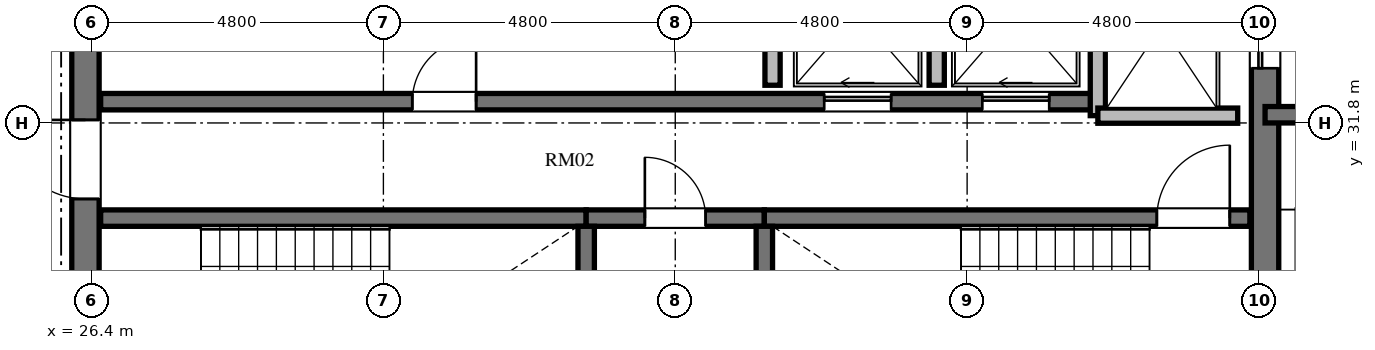
"""IFC4 building model, lengths in metres.
Left out: names, types, materials, properties, quantities, classifications, styles, units other than length and angle.
Written with IfcOpenShell. Run it as: python <this file> out.ifc"""

import sys

from ifc_helpers import new_model, si_unit, direction, frame, frame_2d, origin, place, context, subcontext, project, spatial, rectangle, extrude, element, fill, save


model = new_model("IFC4")
c1 = context("Model", 3, precision=1e-05, world=origin(), true_north=direction((0.0, 1.0)))
c2 = subcontext(c1, "Body", "Model", "MODEL_VIEW")
j1 = project(units=[si_unit("LENGTHUNIT", "METRE"), si_unit("PLANEANGLEUNIT", "RADIAN")], contexts=[c1])
p1 = place(None, origin())
s1 = spatial("IfcSite", under=j1, at=p1, CompositionType="ELEMENT")
p2 = place(p1, origin())
s2 = spatial("IfcBuilding", under=s1, at=p2, CompositionType="ELEMENT")
p3 = place(p2, frame((0.0, 0.0, 242.256)))
s3 = spatial("IfcBuildingStorey", under=s2, at=p3, CompositionType="ELEMENT", Elevation=242.256)
p4 = place(p3, frame((26.3, 20.95, 0.0), z_axis=(0.0, 0.0, 1.0), x_axis=(0.0, 1.0, 0.0)))
e1 = element("IfcWall", 1, at=p4, inside=s3, PredefinedType="SHEAR", context=c2, shape_type="SweptSolid", body=[
    extrude(rectangle(XDim=14.1, YDim=0.45, at=frame_2d((7.05, 0.0))), origin(), (0.0, 0.0, 1.0), 3.648),
])
p5 = place(p4, frame((6.5, 0.0, 0.0)))
e2 = element("IfcOpeningElement", 2, at=p5, cuts=e1, PredefinedType="OPENING", context=c2, shape_type="SweptSolid", body=[
    extrude(rectangle(XDim=1.2, YDim=2.15, at=frame_2d((0.6, 1.075))), frame((0.0, 0.235, 0.0), z_axis=(0.0, -1.0, 0.0), x_axis=(1.0, 0.0, 0.0)), (0.0, 0.0, 1.0), 0.47),
])
p6 = place(p4, frame((9.6, 0.0, 0.0)))
e3 = element("IfcOpeningElement", 3, at=p6, cuts=e1, PredefinedType="OPENING", context=c2, shape_type="SweptSolid", body=[
    extrude(rectangle(XDim=1.3, YDim=2.2, at=frame_2d((0.65, 1.1))), frame((0.0, 0.235, 0.0), z_axis=(0.0, -1.0, 0.0), x_axis=(1.0, 0.0, 0.0)), (0.0, 0.0, 1.0), 0.47),
])
p7 = place(p4, frame((3.26, 0.0, 0.0)))
e4 = element("IfcOpeningElement", 4, at=p7, cuts=e1, PredefinedType="OPENING", context=c2, shape_type="SweptSolid", body=[
    extrude(rectangle(XDim=1.3, YDim=2.2, at=frame_2d((0.65, 1.1))), frame((0.0, 0.235, 0.0), z_axis=(0.0, -1.0, 0.0), x_axis=(1.0, 0.0, 0.0)), (0.0, 0.0, 1.0), 0.47),
])
p8 = place(p3, frame((45.7, 20.95, 0.0), z_axis=(0.0, 0.0, 1.0), x_axis=(0.0, 1.0, 0.0)))
e5 = element("IfcWall", 5, at=p8, inside=s3, PredefinedType="SHEAR", context=c2, shape_type="SweptSolid", body=[
    extrude(rectangle(XDim=14.1, YDim=0.45, at=frame_2d((7.05, 0.0))), origin(), (0.0, 0.0, 1.0), 3.648),
])
p9 = place(p8, frame((11.75, 0.0, 0.0)))
e6 = element("IfcOpeningElement", 6, at=p9, cuts=e5, PredefinedType="OPENING", context=c2, shape_type="SweptSolid", body=[
    extrude(rectangle(XDim=1.4, YDim=2.3, at=frame_2d((0.7, 1.15))), frame((0.0, 0.235, 0.0), z_axis=(0.0, -1.0, 0.0), x_axis=(1.0, 0.0, 0.0)), (0.0, 0.0, 1.0), 0.47),
])
p10 = place(p8, frame((0.95, 0.0, 0.0)))
e7 = element("IfcOpeningElement", 7, at=p10, cuts=e5, PredefinedType="OPENING", context=c2, shape_type="SweptSolid", body=[
    extrude(rectangle(XDim=1.4, YDim=2.3, at=frame_2d((0.7, 1.15))), frame((0.0, 0.235, 0.0), z_axis=(0.0, -1.0, 0.0), x_axis=(1.0, 0.0, 0.0)), (0.0, 0.0, 1.0), 0.47),
])
p11 = place(p3, frame((26.55, 30.235, 0.0), z_axis=(0.0, 0.0, 1.0), x_axis=(1.0, 0.0, 0.0)))
e8 = element("IfcWall", 8, at=p11, inside=s3, PredefinedType="SHEAR", context=c2, shape_type="SweptSolid", body=[
    extrude(rectangle(XDim=7.985, YDim=0.27, at=frame_2d((3.992, 0.0))), origin(), (0.0, 0.0, 1.0), 3.648),
])
p12 = place(p3, frame((34.535, 30.235, 0.0), z_axis=(0.0, 0.0, 1.0), x_axis=(1.0, 0.0, 0.0)))
e9 = element("IfcWall", 9, at=p12, inside=s3, PredefinedType="SHEAR", context=c2, shape_type="SweptSolid", body=[
    extrude(rectangle(XDim=2.93, YDim=0.27, at=frame_2d((1.465, 0.0))), origin(), (0.0, 0.0, 1.0), 3.648),
])
p13 = place(p12, frame((0.965, 0.0, 0.0)))
e10 = element("IfcOpeningElement", 10, at=p13, cuts=e9, PredefinedType="OPENING", context=c2, shape_type="SweptSolid", body=[
    extrude(rectangle(XDim=1.0, YDim=2.1, at=frame_2d((0.5, 1.05))), frame((0.0, 0.145, 0.0), z_axis=(0.0, -1.0, 0.0), x_axis=(1.0, 0.0, 0.0)), (0.0, 0.0, 1.0), 0.29),
])
p14 = place(p3, frame((37.465, 30.235, 0.0), z_axis=(0.0, 0.0, 1.0), x_axis=(1.0, 0.0, 0.0)))
e11 = element("IfcWall", 11, at=p14, inside=s3, PredefinedType="SHEAR", context=c2, shape_type="SweptSolid", body=[
    extrude(rectangle(XDim=7.985, YDim=0.27, at=frame_2d((3.992, 0.0))), origin(), (0.0, 0.0, 1.0), 3.648),
])
p15 = place(p14, frame((6.455, 0.0, 0.0)))
e12 = element("IfcOpeningElement", 12, at=p15, cuts=e11, PredefinedType="OPENING", context=c2, shape_type="SweptSolid", body=[
    extrude(rectangle(XDim=1.2, YDim=2.15, at=frame_2d((0.6, 1.075))), frame((0.0, 0.145, 0.0), z_axis=(0.0, -1.0, 0.0), x_axis=(1.0, 0.0, 0.0)), (0.0, 0.0, 1.0), 0.29),
])
for number, where, z_axis, x_axis in (
    (13, (34.535, 26.02, 0.0), (0.0, 0.0, 1.0), (0.0, 1.0, 0.0)),
    (14, (37.465, 26.02, 0.0), (0.0, 0.0, 1.0), (0.0, 1.0, 0.0)),
):
    element("IfcWall", number, at=place(p3, frame(where, z_axis=z_axis, x_axis=x_axis)), inside=s3, PredefinedType="SHEAR", context=c2, shape_type="SweptSolid", body=[
        extrude(rectangle(XDim=4.08, YDim=0.27, at=frame_2d((2.04, 0.0))), origin(), (0.0, 0.0, 1.0), 3.648),
    ])
p16 = place(p3, frame((26.55, 32.15, 0.0), z_axis=(0.0, 0.0, 1.0), x_axis=(1.0, 0.0, 0.0)))
e15 = element("IfcWall", 15, at=p16, inside=s3, PredefinedType="SHEAR", context=c2, shape_type="SweptSolid", body=[
    extrude(rectangle(XDim=16.4, YDim=0.27, at=frame_2d((8.2, 0.0))), origin(), (0.0, 0.0, 1.0), 3.648),
])
p17 = place(p16, frame((5.125, 0.0, 0.0)))
e16 = element("IfcOpeningElement", 16, at=p17, cuts=e15, PredefinedType="OPENING", context=c2, shape_type="SweptSolid", body=[
    extrude(rectangle(XDim=1.05, YDim=2.15, at=frame_2d((0.525, 1.075))), frame((0.0, 0.145, 0.0), z_axis=(0.0, -1.0, 0.0), x_axis=(1.0, 0.0, 0.0)), (0.0, 0.0, 1.0), 0.29),
])
p18 = place(p16, frame((11.9, 0.0, 0.0)))
e17 = element("IfcOpeningElement", 17, at=p18, cuts=e15, PredefinedType="OPENING", context=c2, shape_type="SweptSolid", body=[
    extrude(rectangle(XDim=1.1, YDim=2.2, at=frame_2d((0.55, 1.1))), frame((0.0, 0.145, 0.0), z_axis=(0.0, -1.0, 0.0), x_axis=(1.0, 0.0, 0.0)), (0.0, 0.0, 1.0), 0.29),
])
p19 = place(p16, frame((14.5, 0.0, 0.0)))
e18 = element("IfcOpeningElement", 18, at=p19, cuts=e15, PredefinedType="OPENING", context=c2, shape_type="SweptSolid", body=[
    extrude(rectangle(XDim=1.1, YDim=2.2, at=frame_2d((0.55, 1.1))), frame((0.0, 0.145, 0.0), z_axis=(0.0, -1.0, 0.0), x_axis=(1.0, 0.0, 0.0)), (0.0, 0.0, 1.0), 0.29),
])
p20 = place(p3, frame((42.95, 31.92, 0.0), z_axis=(0.0, 0.0, 1.0), x_axis=(0.0, 1.0, 0.0)))
e19 = element("IfcWall", 19, at=p20, inside=s3, PredefinedType="SOLIDWALL", context=c2, shape_type="SweptSolid", body=[
    extrude(rectangle(XDim=3.18, YDim=0.25, at=frame_2d((1.59, 0.0))), origin(), (0.0, 0.0, 1.0), 3.198),
])
p21 = place(p3, frame((42.95, 31.92, 0.0), z_axis=(0.0, 0.0, 1.0), x_axis=(1.0, 0.0, 0.0)))
e20 = element("IfcWall", 20, at=p21, inside=s3, PredefinedType="SOLIDWALL", context=c2, shape_type="SweptSolid", body=[
    extrude(rectangle(XDim=2.3, YDim=0.25, at=frame_2d((1.15, 0.0))), origin(), (0.0, 0.0, 1.0), 3.198),
])
for number, where, z_axis, x_axis in (
    (21, (37.6, 32.42, 0.0), (0.0, 0.0, 1.0), (0.0, 1.0, 0.0)),
    (22, (40.3, 32.42, 0.0), (0.0, 0.0, 1.0), (0.0, 1.0, 0.0)),
):
    element("IfcWall", number, at=place(p3, frame(where, z_axis=z_axis, x_axis=x_axis)), inside=s3, PredefinedType="SOLIDWALL", context=c2, shape_type="SweptSolid", body=[
        extrude(rectangle(XDim=2.68, YDim=0.25, at=frame_2d((1.34, 0.0))), origin(), (0.0, 0.0, 1.0), 3.198),
    ])
p22 = place(p3, frame((45.7, 31.935, 0.0), z_axis=(0.0, 0.0, 1.0), x_axis=(1.0, 0.0, 0.0)))
e23 = element("IfcWall", 23, at=p22, inside=s3, PredefinedType="SHEAR", context=c2, shape_type="SweptSolid", body=[
    extrude(rectangle(XDim=4.715, YDim=0.27, at=frame_2d((2.357, 0.0))), origin(), (0.0, 0.0, 1.0), 3.648),
])
p23 = place(p15, origin())
e24 = element("IfcDoor", 24, at=p23, inside=s3, OperationType="SINGLE_SWING_RIGHT", PredefinedType="DOOR", context=c2, shape_type="SweptSolid", body=[
    extrude(rectangle(XDim=1.2, YDim=2.15, at=frame_2d((0.6, 1.075))), frame((0.0, 0.025, 0.0), z_axis=(0.0, -1.0, 0.0), x_axis=(1.0, 0.0, 0.0)), (0.0, 0.0, 1.0), 0.05),
])
fill(e12, e24)
p24 = place(p13, origin())
e25 = element("IfcDoor", 25, at=p24, inside=s3, OperationType="SINGLE_SWING_LEFT", PredefinedType="DOOR", context=c2, shape_type="SweptSolid", body=[
    extrude(rectangle(XDim=1.0, YDim=2.1, at=frame_2d((0.5, 1.05))), frame((0.0, 0.025, 0.0), z_axis=(0.0, -1.0, 0.0), x_axis=(1.0, 0.0, 0.0)), (0.0, 0.0, 1.0), 0.05),
])
fill(e10, e25)
p25 = place(p6, origin())
e26 = element("IfcDoor", 26, at=p25, inside=s3, OperationType="SINGLE_SWING_RIGHT", PredefinedType="DOOR", context=c2, shape_type="SweptSolid", body=[
    extrude(rectangle(XDim=1.3, YDim=2.2, at=frame_2d((0.65, 1.1))), frame((0.0, 0.025, 0.0), z_axis=(0.0, -1.0, 0.0), x_axis=(1.0, 0.0, 0.0)), (0.0, 0.0, 1.0), 0.05),
])
fill(e3, e26)
p26 = place(p17, origin())
e27 = element("IfcDoor", 27, at=p26, inside=s3, OperationType="SINGLE_SWING_RIGHT", PredefinedType="DOOR", context=c2, shape_type="SweptSolid", body=[
    extrude(rectangle(XDim=1.05, YDim=2.15, at=frame_2d((0.525, 1.075))), frame((0.0, 0.025, 0.0), z_axis=(0.0, -1.0, 0.0), x_axis=(1.0, 0.0, 0.0)), (0.0, 0.0, 1.0), 0.05),
])
fill(e16, e27)
p27 = place(p18, origin())
e28 = element("IfcDoor", 28, at=p27, inside=s3, OperationType="SLIDING_TO_LEFT", PredefinedType="DOOR", context=c2, shape_type="SweptSolid", body=[
    extrude(rectangle(XDim=1.1, YDim=2.2, at=frame_2d((0.55, 1.1))), frame((0.0, 0.025, 0.0), z_axis=(0.0, -1.0, 0.0), x_axis=(1.0, 0.0, 0.0)), (0.0, 0.0, 1.0), 0.05),
])
fill(e17, e28)
p28 = place(p19, origin())
e29 = element("IfcDoor", 29, at=p28, inside=s3, OperationType="SLIDING_TO_LEFT", PredefinedType="DOOR", context=c2, shape_type="SweptSolid", body=[
    extrude(rectangle(XDim=1.1, YDim=2.2, at=frame_2d((0.55, 1.1))), frame((0.0, 0.025, 0.0), z_axis=(0.0, -1.0, 0.0), x_axis=(1.0, 0.0, 0.0)), (0.0, 0.0, 1.0), 0.05),
])
fill(e18, e29)
p29 = place(p9, origin())
e30 = element("IfcDoor", 30, at=p29, inside=s3, OperationType="SLIDING_TO_LEFT", PredefinedType="DOOR", context=c2, shape_type="SweptSolid", body=[
    extrude(rectangle(XDim=1.4, YDim=2.3, at=frame_2d((0.7, 1.15))), frame((0.0, 0.025, 0.0), z_axis=(0.0, -1.0, 0.0), x_axis=(1.0, 0.0, 0.0)), (0.0, 0.0, 1.0), 0.05),
])
fill(e6, e30)
save(model, sys.argv[1])
